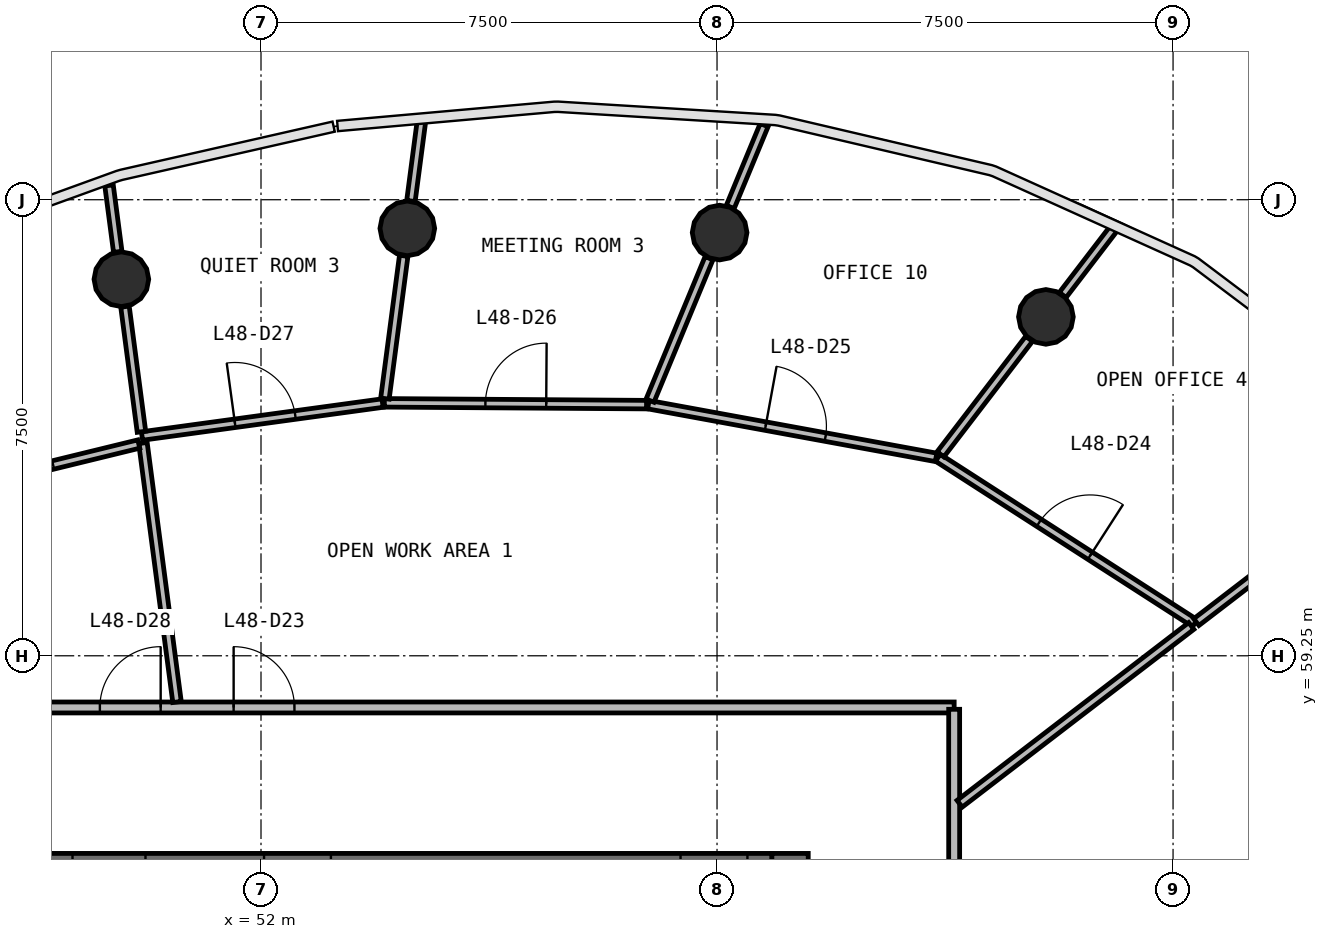
"""IFC4 building model, lengths in metres.
Left out: names, types, materials, properties, quantities, classifications, styles, units other than length and angle.
Written with IfcOpenShell. Run it as: python <this file> out.ifc"""

import sys

from ifc_helpers import new_model, si_unit, direction, frame, frame_2d, origin, origin_2d, place, context, subcontext, project, spatial, rectangle, circle, extrude, source, transform, mapped, element, fill, save


model = new_model("IFC4")
c1 = context("Model", 3, precision=1e-05, world=origin(), true_north=direction((0.0, 1.0)))
c2 = subcontext(c1, "Body", "Model", "MODEL_VIEW")
j1 = project(units=[si_unit("LENGTHUNIT", "METRE"), si_unit("PLANEANGLEUNIT", "RADIAN")], contexts=[c1])
p1 = place(None, origin())
s1 = spatial("IfcSite", under=j1, at=p1, CompositionType="ELEMENT")
p2 = place(p1, origin())
s2 = spatial("IfcBuilding", under=s1, at=p2, CompositionType="ELEMENT")
p3 = place(p2, frame((0.0, 0.0, 199.4)))
s3 = spatial("IfcBuildingStorey", under=s2, at=p3, CompositionType="ELEMENT", Elevation=199.4)
p4 = place(p3, frame((60.7, 40.0, 0.0), z_axis=(0.0, 0.0, 1.0), x_axis=(0.0, 1.0, 0.0)))
e1 = element("IfcWall", 1, at=p4, inside=s3, PredefinedType="SHEAR", context=c2, shape_type="SweptSolid", body=[
    extrude(rectangle(XDim=16.0, YDim=0.6, at=frame_2d((8.0, 0.0))), origin(), (0.0, 0.0, 1.0), 3.9),
])
p5 = place(p4, frame((7.1, 0.0, 0.0)))
e2 = element("IfcOpeningElement", 2, at=p5, cuts=e1, PredefinedType="OPENING", context=c2, shape_type="SweptSolid", body=[
    extrude(rectangle(XDim=1.8, YDim=2.1, at=frame_2d((0.9, 1.05))), frame((0.0, 0.31, 0.0), z_axis=(0.0, -1.0, 0.0), x_axis=(1.0, 0.0, 0.0)), (0.0, 0.0, 1.0), 0.62),
])
p6 = place(p3, frame((60.4, 55.7, 0.0), z_axis=(0.0, 0.0, 1.0), x_axis=(-1.0, 0.0, 0.0)))
e3 = element("IfcWall", 3, at=p6, inside=s3, PredefinedType="SHEAR", context=c2, shape_type="SweptSolid", body=[
    extrude(rectangle(XDim=16.8, YDim=0.6, at=frame_2d((8.4, 0.0))), origin(), (0.0, 0.0, 1.0), 3.9),
])
p7 = place(p6, frame((0.4, 0.0, 0.0)))
e4 = element("IfcOpeningElement", 4, at=p7, cuts=e3, PredefinedType="OPENING", context=c2, shape_type="SweptSolid", body=[
    extrude(rectangle(XDim=1.1, YDim=2.1, at=frame_2d((0.55, 1.05))), frame((0.0, 0.31, 0.0), z_axis=(0.0, -1.0, 0.0), x_axis=(1.0, 0.0, 0.0)), (0.0, 0.0, 1.0), 0.62),
])
p8 = place(p6, frame((10.3, 0.0, 0.0)))
e5 = element("IfcOpeningElement", 5, at=p8, cuts=e3, PredefinedType="OPENING", context=c2, shape_type="SweptSolid", body=[
    extrude(rectangle(XDim=1.2, YDim=2.1, at=frame_2d((0.6, 1.05))), frame((0.0, 0.31, 0.0), z_axis=(0.0, -1.0, 0.0), x_axis=(1.0, 0.0, 0.0)), (0.0, 0.0, 1.0), 0.62),
])
p9 = place(p6, frame((7.25, 0.0, 0.0)))
e6 = element("IfcOpeningElement", 6, at=p9, cuts=e3, PredefinedType="OPENING", context=c2, shape_type="SweptSolid", body=[
    extrude(rectangle(XDim=1.1, YDim=2.1, at=frame_2d((0.55, 1.05))), frame((0.0, 0.31, 0.0), z_axis=(0.0, -1.0, 0.0), x_axis=(1.0, 0.0, 0.0)), (0.0, 0.0, 1.0), 0.62),
])
m1 = source(origin(), c2, "Body", "SweptSolid", [
    extrude(circle(Radius=0.45, at=origin_2d()), origin(), (0.0, 0.0, 1.0), 3.9),
])
for number, where, z_axis, x_axis in (
    (7, (64.909, 64.823, 0.0), (0.0, 0.0, 1.0), (1.0, 0.0, 0.0)),
    (8, (59.543, 66.21, 0.0), (0.0, 0.0, 1.0), (1.0, 0.0, 0.0)),
    (9, (54.406, 66.278, 0.0), (0.0, 0.0, 1.0), (1.0, 0.0, 0.0)),
    (10, (49.704, 65.442, 0.0), (0.0, 0.0, 1.0), (1.0, 0.0, 0.0)),
):
    element("IfcColumn", number, at=place(p3, frame(where, z_axis=z_axis, x_axis=x_axis)), inside=s3, PredefinedType="COLUMN", context=c2, shape_type="MappedRepresentation", body=[
        mapped(m1, transform((0.0, 0.0, 0.0), scale=1.0)),
    ])
p10 = place(p3, frame((40.6, 58.4, 0.0), z_axis=(0.0, 0.0, 1.0), x_axis=(1.0, 0.0, 0.0)))
e11 = element("IfcWall", 11, at=p10, inside=s3, PredefinedType="PARTITIONING", context=c2, shape_type="SweptSolid", body=[
    extrude(rectangle(XDim=22.8, YDim=0.18, at=frame_2d((11.4, 0.0))), origin(), (0.0, 0.0, 1.0), 2.88),
])
p11 = place(p10, frame((10.95, 0.0, 0.0)))
e12 = element("IfcOpeningElement", 12, at=p11, cuts=e11, PredefinedType="OPENING", context=c2, shape_type="SweptSolid", body=[
    extrude(rectangle(XDim=1.0, YDim=2.1, at=frame_2d((0.5, 1.05))), frame((0.0, 0.1, 0.0), z_axis=(0.0, -1.0, 0.0), x_axis=(1.0, 0.0, 0.0)), (0.0, 0.0, 1.0), 0.2),
])
p12 = place(p10, frame((8.75, 0.0, 0.0)))
e13 = element("IfcOpeningElement", 13, at=p12, cuts=e11, PredefinedType="OPENING", context=c2, shape_type="SweptSolid", body=[
    extrude(rectangle(XDim=1.0, YDim=2.1, at=frame_2d((0.5, 1.05))), frame((0.0, 0.1, 0.0), z_axis=(0.0, -1.0, 0.0), x_axis=(1.0, 0.0, 0.0)), (0.0, 0.0, 1.0), 0.2),
])
p13 = place(p3, frame((63.4, 58.37, 0.0), z_axis=(0.0, 0.0, 1.0), x_axis=(0.0, -1.0, 0.0)))
e14 = element("IfcWall", 14, at=p13, inside=s3, PredefinedType="PARTITIONING", context=c2, shape_type="SweptSolid", body=[
    extrude(rectangle(XDim=20.74, YDim=0.18, at=frame_2d((10.37, 0.0))), origin(), (0.0, 0.0, 1.0), 2.88),
])
p14 = place(p13, frame((9.99, 0.0, 0.0)))
e15 = element("IfcOpeningElement", 15, at=p14, cuts=e14, PredefinedType="OPENING", context=c2, shape_type="SweptSolid", body=[
    extrude(rectangle(XDim=0.9, YDim=2.1, at=frame_2d((0.45, 1.05))), frame((0.0, 0.1, 0.0), z_axis=(0.0, -1.0, 0.0), x_axis=(1.0, 0.0, 0.0)), (0.0, 0.0, 1.0), 0.2),
])
p15 = place(p13, frame((7.79, 0.0, 0.0)))
e16 = element("IfcOpeningElement", 16, at=p15, cuts=e14, PredefinedType="OPENING", context=c2, shape_type="SweptSolid", body=[
    extrude(rectangle(XDim=0.9, YDim=2.1, at=frame_2d((0.45, 1.05))), frame((0.0, 0.1, 0.0), z_axis=(0.0, -1.0, 0.0), x_axis=(1.0, 0.0, 0.0)), (0.0, 0.0, 1.0), 0.2),
])
p16 = place(p13, frame((4.29, 0.0, 0.0)))
e17 = element("IfcOpeningElement", 17, at=p16, cuts=e14, PredefinedType="OPENING", context=c2, shape_type="SweptSolid", body=[
    extrude(rectangle(XDim=1.0, YDim=2.1, at=frame_2d((0.5, 1.05))), frame((0.0, 0.1, 0.0), z_axis=(0.0, -1.0, 0.0), x_axis=(1.0, 0.0, 0.0)), (0.0, 0.0, 1.0), 0.2),
])
p17 = place(p13, frame((12.09, 0.0, 0.0)))
e18 = element("IfcOpeningElement", 18, at=p17, cuts=e14, PredefinedType="OPENING", context=c2, shape_type="SweptSolid", body=[
    extrude(rectangle(XDim=1.0, YDim=2.1, at=frame_2d((0.5, 1.05))), frame((0.0, 0.1, 0.0), z_axis=(0.0, -1.0, 0.0), x_axis=(1.0, 0.0, 0.0)), (0.0, 0.0, 1.0), 0.2),
])
p18 = place(p3, frame((72.333, 56.422, 0.0), z_axis=(0.0, 0.0, 1.0), x_axis=(-0.92388406428, -0.382672491525, 0.0)))
e19 = element("IfcWall", 19, at=p18, inside=s3, PredefinedType="PARTITIONING", context=c2, shape_type="SweptSolid", body=[
    extrude(rectangle(XDim=6.275, YDim=0.14, at=frame_2d((3.138, 0.0))), origin(), (0.0, 0.0, 1.0), 2.88),
])
p19 = place(p18, frame((2.625, 0.0, 0.0)))
e20 = element("IfcOpeningElement", 20, at=p19, cuts=e19, PredefinedType="OPENING", context=c2, shape_type="SweptSolid", body=[
    extrude(rectangle(XDim=1.0, YDim=2.1, at=frame_2d((0.5, 1.05))), frame((0.0, 0.08, 0.0), z_axis=(0.0, -1.0, 0.0), x_axis=(1.0, 0.0, 0.0)), (0.0, 0.0, 1.0), 0.16),
])
p20 = place(p3, frame((63.132, 62.508, 0.0), z_axis=(0.0, 0.0, 1.0), x_axis=(0.840745911146, -0.541429878092, 0.0)))
e21 = element("IfcWall", 21, at=p20, inside=s3, PredefinedType="PARTITIONING", context=c2, shape_type="SweptSolid", body=[
    extrude(rectangle(XDim=5.028, YDim=0.14, at=frame_2d((2.514, 0.0))), origin(), (0.0, 0.0, 1.0), 2.88),
])
p21 = place(p20, frame((1.978, 0.0, 0.0)))
e22 = element("IfcOpeningElement", 22, at=p21, cuts=e21, PredefinedType="OPENING", context=c2, shape_type="SweptSolid", body=[
    extrude(rectangle(XDim=1.0, YDim=2.1, at=frame_2d((0.5, 1.05))), frame((0.0, 0.08, 0.0), z_axis=(0.0, -1.0, 0.0), x_axis=(1.0, 0.0, 0.0)), (0.0, 0.0, 1.0), 0.16),
])
p22 = place(p3, frame((63.49, 56.817, 0.0), z_axis=(0.0, 0.0, 1.0), x_axis=(0.793351007213, 0.608764469523, 0.0)))
e23 = element("IfcWall", 23, at=p22, inside=s3, PredefinedType="PARTITIONING", context=c2, shape_type="SweptSolid", body=[
    extrude(rectangle(XDim=4.802, YDim=0.14, at=frame_2d((2.401, 0.0))), origin(), (0.0, 0.0, 1.0), 2.88),
])
p23 = place(p3, frame((58.371, 63.38, 0.0), z_axis=(0.0, 0.0, 1.0), x_axis=(0.983627854142, -0.180211665982, 0.0)))
e24 = element("IfcWall", 24, at=p23, inside=s3, PredefinedType="PARTITIONING", context=c2, shape_type="SweptSolid", body=[
    extrude(rectangle(XDim=4.811, YDim=0.14, at=frame_2d((2.405, 0.0))), origin(), (0.0, 0.0, 1.0), 2.88),
])
p24 = place(p23, frame((1.961, 0.0, 0.0)))
e25 = element("IfcOpeningElement", 25, at=p24, cuts=e24, PredefinedType="OPENING", context=c2, shape_type="SweptSolid", body=[
    extrude(rectangle(XDim=1.0, YDim=2.1, at=frame_2d((0.5, 1.05))), frame((0.0, 0.08, 0.0), z_axis=(0.0, -1.0, 0.0), x_axis=(1.0, 0.0, 0.0)), (0.0, 0.0, 1.0), 0.16),
])
p25 = place(p3, frame((50.619, 58.49, 0.0), z_axis=(0.0, 0.0, 1.0), x_axis=(-0.13048832594, 0.991449845829, 0.0)))
e26 = element("IfcWall", 26, at=p25, inside=s3, PredefinedType="PARTITIONING", context=c2, shape_type="SweptSolid", body=[
    extrude(rectangle(XDim=4.296, YDim=0.14, at=frame_2d((2.148, 0.0))), origin(), (0.0, 0.0, 1.0), 2.88),
])
p26 = place(p3, frame((54.029, 63.41, 0.0), z_axis=(0.0, 0.0, 1.0), x_axis=(0.999976141478, -0.006907711299, 0.0)))
e27 = element("IfcWall", 27, at=p26, inside=s3, PredefinedType="PARTITIONING", context=c2, shape_type="SweptSolid", body=[
    extrude(rectangle(XDim=4.312, YDim=0.14, at=frame_2d((2.156, 0.0))), origin(), (0.0, 0.0, 1.0), 2.88),
])
p27 = place(p26, frame((1.662, 0.0, 0.0)))
e28 = element("IfcOpeningElement", 28, at=p27, cuts=e27, PredefinedType="OPENING", context=c2, shape_type="SweptSolid", body=[
    extrude(rectangle(XDim=1.0, YDim=2.1, at=frame_2d((0.5, 1.05))), frame((0.0, 0.08, 0.0), z_axis=(0.0, -1.0, 0.0), x_axis=(1.0, 0.0, 0.0)), (0.0, 0.0, 1.0), 0.16),
])
p28 = place(p3, frame((50.043, 62.864, 0.0), z_axis=(0.0, 0.0, 1.0), x_axis=(0.990760455896, 0.135623445731, 0.0)))
e29 = element("IfcWall", 29, at=p28, inside=s3, PredefinedType="PARTITIONING", context=c2, shape_type="SweptSolid", body=[
    extrude(rectangle(XDim=3.993, YDim=0.14, at=frame_2d((1.996, 0.0))), origin(), (0.0, 0.0, 1.0), 2.88),
])
p29 = place(p28, frame((1.543, 0.0, 0.0)))
e30 = element("IfcOpeningElement", 30, at=p29, cuts=e29, PredefinedType="OPENING", context=c2, shape_type="SweptSolid", body=[
    extrude(rectangle(XDim=1.0, YDim=2.1, at=frame_2d((0.5, 1.05))), frame((0.0, 0.08, 0.0), z_axis=(0.0, -1.0, 0.0), x_axis=(1.0, 0.0, 0.0)), (0.0, 0.0, 1.0), 0.16),
])
p30 = place(p3, frame((46.303, 61.832, 0.0), z_axis=(0.0, 0.0, 1.0), x_axis=(0.971437570749, 0.23729527205, 0.0)))
e31 = element("IfcWall", 31, at=p30, inside=s3, PredefinedType="PARTITIONING", context=c2, shape_type="SweptSolid", body=[
    extrude(rectangle(XDim=3.795, YDim=0.14, at=frame_2d((1.898, 0.0))), origin(), (0.0, 0.0, 1.0), 2.88),
])
p31 = place(p30, frame((1.345, 0.0, 0.0)))
e32 = element("IfcOpeningElement", 32, at=p31, cuts=e31, PredefinedType="OPENING", context=c2, shape_type="SweptSolid", body=[
    extrude(rectangle(XDim=1.0, YDim=2.1, at=frame_2d((0.5, 1.05))), frame((0.0, 0.08, 0.0), z_axis=(0.0, -1.0, 0.0), x_axis=(1.0, 0.0, 0.0)), (0.0, 0.0, 1.0), 0.16),
])
p32 = place(p3, frame((67.383, 59.804, 0.0), z_axis=(0.0, 0.0, 1.0), x_axis=(0.793357937247, 0.608755438092, 0.0)))
e33 = element("IfcWall", 33, at=p32, inside=s3, PredefinedType="PARTITIONING", context=c2, shape_type="SweptSolid", body=[
    extrude(rectangle(XDim=2.595, YDim=0.14, at=frame_2d((1.297, 0.0))), origin(), (0.0, 0.0, 1.0), 2.88),
])
p33 = place(p3, frame((58.398, 63.446, 0.0), z_axis=(0.0, 0.0, 1.0), x_axis=(0.382748544054, 0.923852559679, 0.0)))
e34 = element("IfcWall", 34, at=p33, inside=s3, PredefinedType="PARTITIONING", context=c2, shape_type="SweptSolid", body=[
    extrude(rectangle(XDim=2.536, YDim=0.14, at=frame_2d((1.268, 0.0))), origin(), (0.0, 0.0, 1.0), 2.88),
])
p34 = place(p3, frame((63.175, 62.563, 0.0), z_axis=(0.0, 0.0, 1.0), x_axis=(0.608759077064, 0.793355144996, 0.0)))
e35 = element("IfcWall", 35, at=p34, inside=s3, PredefinedType="PARTITIONING", context=c2, shape_type="SweptSolid", body=[
    extrude(rectangle(XDim=2.394, YDim=0.14, at=frame_2d((1.197, 0.0))), origin(), (0.0, 0.0, 1.0), 2.88),
])
p35 = place(p3, frame((54.038, 63.48, 0.0), z_axis=(0.0, 0.0, 1.0), x_axis=(0.130617183763, 0.991432877862, 0.0)))
e36 = element("IfcWall", 36, at=p35, inside=s3, PredefinedType="PARTITIONING", context=c2, shape_type="SweptSolid", body=[
    extrude(rectangle(XDim=2.368, YDim=0.14, at=frame_2d((1.184, 0.0))), origin(), (0.0, 0.0, 1.0), 2.88),
])
p36 = place(p3, frame((50.034, 62.934, 0.0), z_axis=(0.0, 0.0, 1.0), x_axis=(-0.130530560755, 0.991444286236, 0.0)))
e37 = element("IfcWall", 37, at=p36, inside=s3, PredefinedType="PARTITIONING", context=c2, shape_type="SweptSolid", body=[
    extrude(rectangle(XDim=2.076, YDim=0.14, at=frame_2d((1.038, 0.0))), origin(), (0.0, 0.0, 1.0), 2.88),
])
p37 = place(p3, frame((59.717, 66.63, 0.0), z_axis=(0.0, 0.0, 1.0), x_axis=(0.382652525483, 0.923892333955, 0.0)))
e38 = element("IfcWall", 38, at=p37, inside=s3, PredefinedType="PARTITIONING", context=c2, shape_type="SweptSolid", body=[
    extrude(rectangle(XDim=1.458, YDim=0.14, at=frame_2d((0.729, 0.0))), origin(), (0.0, 0.0, 1.0), 2.88),
])
p38 = place(p3, frame((65.186, 65.184, 0.0), z_axis=(0.0, 0.0, 1.0), x_axis=(0.608686646562, 0.793410717281, 0.0)))
e39 = element("IfcWall", 39, at=p38, inside=s3, PredefinedType="PARTITIONING", context=c2, shape_type="SweptSolid", body=[
    extrude(rectangle(XDim=1.406, YDim=0.14, at=frame_2d((0.703, 0.0))), origin(), (0.0, 0.0, 1.0), 2.88),
])
p39 = place(p3, frame((54.466, 66.729, 0.0), z_axis=(0.0, 0.0, 1.0), x_axis=(0.13056005306, 0.991440402921, 0.0)))
e40 = element("IfcWall", 40, at=p39, inside=s3, PredefinedType="PARTITIONING", context=c2, shape_type="SweptSolid", body=[
    extrude(rectangle(XDim=1.316, YDim=0.14, at=frame_2d((0.658, 0.0))), origin(), (0.0, 0.0, 1.0), 2.88),
])
p40 = place(p3, frame((49.644, 65.893, 0.0), z_axis=(0.0, 0.0, 1.0), x_axis=(-0.130551983722, 0.991441465517, 0.0)))
e41 = element("IfcWall", 41, at=p40, inside=s3, PredefinedType="PARTITIONING", context=c2, shape_type="SweptSolid", body=[
    extrude(rectangle(XDim=1.102, YDim=0.14, at=frame_2d((0.551, 0.0))), origin(), (0.0, 0.0, 1.0), 2.88),
])
m2 = source(origin(), c2, "Body", "SweptSolid", [
    extrude(rectangle(XDim=1.0, YDim=2.1, at=frame_2d((0.5, 1.05))), frame((0.0, 0.025, 0.0), z_axis=(0.0, -1.0, 0.0), x_axis=(1.0, 0.0, 0.0)), (0.0, 0.0, 1.0), 0.05),
])
p41 = place(p11, origin())
e42 = element("IfcDoor", 42, at=p41, inside=s3, OperationType="SINGLE_SWING_LEFT", PredefinedType="DOOR", context=c2, shape_type="MappedRepresentation", body=[
    mapped(m2, transform((0.0, 0.0, 0.0), scale=1.0)),
])
fill(e12, e42)
p42 = place(p21, origin())
e43 = element("IfcDoor", 43, at=p42, inside=s3, OperationType="SINGLE_SWING_RIGHT", PredefinedType="DOOR", context=c2, shape_type="MappedRepresentation", body=[
    mapped(m2, transform((0.0, 0.0, 0.0), scale=1.0)),
])
fill(e22, e43)
p43 = place(p24, origin())
e44 = element("IfcDoor", 44, at=p43, inside=s3, OperationType="SINGLE_SWING_LEFT", PredefinedType="DOOR", context=c2, shape_type="MappedRepresentation", body=[
    mapped(m2, transform((0.0, 0.0, 0.0), scale=1.0)),
])
fill(e25, e44)
p44 = place(p27, origin())
e45 = element("IfcDoor", 45, at=p44, inside=s3, OperationType="SINGLE_SWING_RIGHT", PredefinedType="DOOR", context=c2, shape_type="MappedRepresentation", body=[
    mapped(m2, transform((0.0, 0.0, 0.0), scale=1.0)),
])
fill(e28, e45)
p45 = place(p29, origin())
e46 = element("IfcDoor", 46, at=p45, inside=s3, OperationType="SINGLE_SWING_LEFT", PredefinedType="DOOR", context=c2, shape_type="MappedRepresentation", body=[
    mapped(m2, transform((0.0, 0.0, 0.0), scale=1.0)),
])
fill(e30, e46)
p46 = place(p12, origin())
e47 = element("IfcDoor", 47, at=p46, inside=s3, OperationType="SINGLE_SWING_RIGHT", PredefinedType="DOOR", context=c2, shape_type="MappedRepresentation", body=[
    mapped(m2, transform((0.0, 0.0, 0.0), scale=1.0)),
])
fill(e13, e47)
p47 = place(p31, origin())
e48 = element("IfcDoor", 48, at=p47, inside=s3, OperationType="SINGLE_SWING_LEFT", PredefinedType="DOOR", context=c2, shape_type="MappedRepresentation", body=[
    mapped(m2, transform((0.0, 0.0, 0.0), scale=1.0)),
])
fill(e32, e48)
save(model, sys.argv[1])
